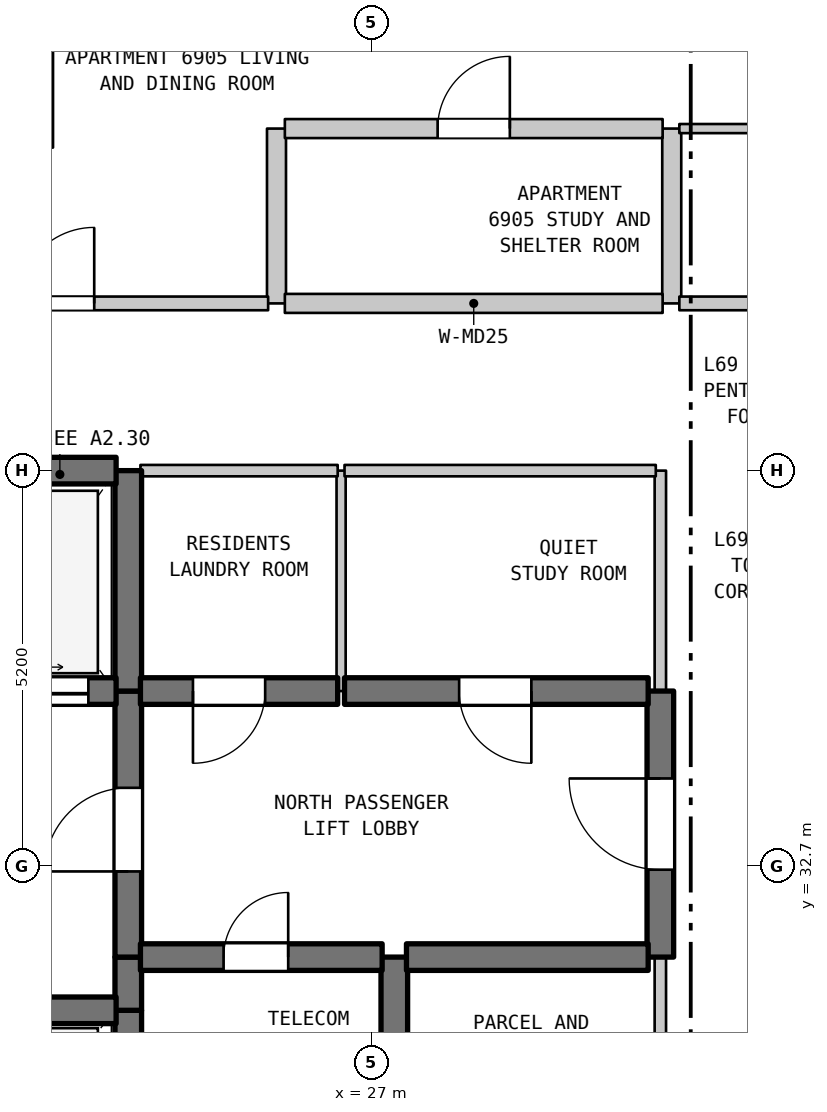
"""IFC4 building model, lengths in metres.
Left out: names, types, materials, properties, quantities, classifications, styles, units other than length and angle.
Written with IfcOpenShell. Run it as: python <this file> out.ifc"""

import sys

from ifc_helpers import new_model, si_unit, direction, frame, frame_2d, origin, place, context, subcontext, project, spatial, rectangle, extrude, element, fill, save


model = new_model("IFC4")
c1 = context("Model", 3, precision=1e-05, world=origin(), true_north=direction((0.0, 1.0)))
c2 = subcontext(c1, "Body", "Model", "MODEL_VIEW")
j1 = project(units=[si_unit("LENGTHUNIT", "METRE"), si_unit("PLANEANGLEUNIT", "RADIAN")], contexts=[c1])
p1 = place(None, origin())
s1 = spatial("IfcSite", under=j1, at=p1, CompositionType="ELEMENT")
p2 = place(p1, origin())
s2 = spatial("IfcBuilding", under=s1, at=p2, CompositionType="ELEMENT")
p3 = place(p2, frame((0.0, 0.0, 276.9)))
s3 = spatial("IfcBuildingStorey", under=s2, at=p3, CompositionType="ELEMENT", Elevation=276.9)
p4 = place(p3, frame((22.75, 42.15, 0.0), z_axis=(0.0, 0.0, 1.0), x_axis=(0.0, 1.0, 0.0)))
e1 = element("IfcWall", 1, at=p4, inside=s3, PredefinedType="PARTITIONING", context=c2, shape_type="SweptSolid", body=[
    extrude(rectangle(XDim=3.15, YDim=0.12, at=frame_2d((1.575, 0.0))), origin(), (0.0, 0.0, 1.0), 3.39),
])
p5 = place(p3, frame((23.8, 28.2, 0.0), z_axis=(0.0, 0.0, 1.0), x_axis=(0.0, 1.0, 0.0)))
e2 = element("IfcWall", 2, at=p5, inside=s3, PredefinedType="SHEAR", context=c2, shape_type="SweptSolid", body=[
    extrude(rectangle(XDim=2.6, YDim=0.35, at=frame_2d((1.3, 0.0))), origin(), (0.0, 0.0, 1.0), 3.39),
])
p6 = place(p3, frame((23.8, 30.8, 0.0), z_axis=(0.0, 0.0, 1.0), x_axis=(0.0, 1.0, 0.0)))
e3 = element("IfcWall", 3, at=p6, inside=s3, PredefinedType="SHEAR", context=c2, shape_type="SweptSolid", body=[
    extrude(rectangle(XDim=0.7, YDim=0.35, at=frame_2d((0.35, 0.0))), origin(), (0.0, 0.0, 1.0), 3.39),
])
p7 = place(p3, frame((23.8, 31.5, 0.0), z_axis=(0.0, 0.0, 1.0), x_axis=(0.0, 1.0, 0.0)))
e4 = element("IfcWall", 4, at=p7, inside=s3, PredefinedType="SHEAR", context=c2, shape_type="SweptSolid", body=[
    extrude(rectangle(XDim=3.5, YDim=0.35, at=frame_2d((1.75, 0.0))), origin(), (0.0, 0.0, 1.0), 3.39),
])
p8 = place(p7, frame((1.127, 0.0, 0.0)))
e5 = element("IfcOpeningElement", 5, at=p8, cuts=e4, PredefinedType="OPENING", context=c2, shape_type="SweptSolid", body=[
    extrude(rectangle(XDim=1.1, YDim=2.15, at=frame_2d((0.55, 1.075))), frame((0.0, 0.185, 0.0), z_axis=(0.0, -1.0, 0.0), x_axis=(1.0, 0.0, 0.0)), (0.0, 0.0, 1.0), 0.37),
])
p9 = place(p3, frame((23.8, 35.0, 0.0), z_axis=(0.0, 0.0, 1.0), x_axis=(0.0, 1.0, 0.0)))
e6 = element("IfcWall", 6, at=p9, inside=s3, PredefinedType="SHEAR", context=c2, shape_type="SweptSolid", body=[
    extrude(rectangle(XDim=2.9, YDim=0.35, at=frame_2d((1.45, 0.0))), origin(), (0.0, 0.0, 1.0), 3.39),
])
p10 = place(p3, frame((25.75, 40.1, 0.0), z_axis=(0.0, 0.0, 1.0), x_axis=(0.0, 1.0, 0.0)))
e7 = element("IfcWall", 7, at=p10, inside=s3, PredefinedType="STANDARD", context=c2, shape_type="SweptSolid", body=[
    extrude(rectangle(XDim=2.3, YDim=0.25, at=frame_2d((1.15, 0.0))), origin(), (0.0, 0.0, 1.0), 3.39),
])
p11 = place(p3, frame((26.6, 35.0, 0.0), z_axis=(0.0, 0.0, 1.0), x_axis=(0.0, 1.0, 0.0)))
e8 = element("IfcWall", 8, at=p11, inside=s3, PredefinedType="PARTITIONING", context=c2, shape_type="SweptSolid", body=[
    extrude(rectangle(XDim=2.9, YDim=0.12, at=frame_2d((1.45, 0.0))), origin(), (0.0, 0.0, 1.0), 3.39),
])
p12 = place(p3, frame((27.3, 28.9, 0.0), z_axis=(0.0, 0.0, 1.0), x_axis=(0.0, 1.0, 0.0)))
e9 = element("IfcWall", 9, at=p12, inside=s3, PredefinedType="SHEAR", context=c2, shape_type="SweptSolid", body=[
    extrude(rectangle(XDim=2.6, YDim=0.35, at=frame_2d((1.3, 0.0))), origin(), (0.0, 0.0, 1.0), 3.39),
])
p13 = place(p3, frame((30.8, 28.9, 0.0), z_axis=(0.0, 0.0, 1.0), x_axis=(0.0, 1.0, 0.0)))
e10 = element("IfcWall", 10, at=p13, inside=s3, PredefinedType="STANDARD", context=c2, shape_type="SweptSolid", body=[
    extrude(rectangle(XDim=2.6, YDim=0.15, at=frame_2d((1.3, 0.0))), origin(), (0.0, 0.0, 1.0), 3.39),
])
p14 = place(p3, frame((30.8, 31.5, 0.0), z_axis=(0.0, 0.0, 1.0), x_axis=(0.0, 1.0, 0.0)))
e11 = element("IfcWall", 11, at=p14, inside=s3, PredefinedType="SHEAR", context=c2, shape_type="SweptSolid", body=[
    extrude(rectangle(XDim=3.5, YDim=0.35, at=frame_2d((1.75, 0.0))), origin(), (0.0, 0.0, 1.0), 3.39),
])
p15 = place(p14, frame((1.15, 0.0, 0.0)))
e12 = element("IfcOpeningElement", 12, at=p15, cuts=e11, PredefinedType="OPENING", context=c2, shape_type="SweptSolid", body=[
    extrude(rectangle(XDim=1.2, YDim=2.2, at=frame_2d((0.6, 1.1))), frame((0.0, 0.185, 0.0), z_axis=(0.0, -1.0, 0.0), x_axis=(1.0, 0.0, 0.0)), (0.0, 0.0, 1.0), 0.37),
])
p16 = place(p3, frame((30.8, 35.0, 0.0), z_axis=(0.0, 0.0, 1.0), x_axis=(0.0, 1.0, 0.0)))
e13 = element("IfcWall", 13, at=p16, inside=s3, PredefinedType="STANDARD", context=c2, shape_type="SweptSolid", body=[
    extrude(rectangle(XDim=2.9, YDim=0.15, at=frame_2d((1.45, 0.0))), origin(), (0.0, 0.0, 1.0), 3.39),
])
p17 = place(p3, frame((30.95, 40.1, 0.0), z_axis=(0.0, 0.0, 1.0), x_axis=(0.0, 1.0, 0.0)))
e14 = element("IfcWall", 14, at=p17, inside=s3, PredefinedType="STANDARD", context=c2, shape_type="SweptSolid", body=[
    extrude(rectangle(XDim=2.3, YDim=0.25, at=frame_2d((1.15, 0.0))), origin(), (0.0, 0.0, 1.0), 3.39),
])
p18 = place(p3, frame((19.16, 30.8, 0.0), z_axis=(0.0, 0.0, 1.0), x_axis=(1.0, 0.0, 0.0)))
e15 = element("IfcWall", 15, at=p18, inside=s3, PredefinedType="SHEAR", context=c2, shape_type="SweptSolid", body=[
    extrude(rectangle(XDim=4.48, YDim=0.35, at=frame_2d((2.24, 0.0))), origin(), (0.0, 0.0, 1.0), 3.39),
])
p19 = place(p3, frame((23.96, 31.5, 0.0), z_axis=(0.0, 0.0, 1.0), x_axis=(1.0, 0.0, 0.0)))
e16 = element("IfcWall", 16, at=p19, inside=s3, PredefinedType="SHEAR", context=c2, shape_type="SweptSolid", body=[
    extrude(rectangle(XDim=3.18, YDim=0.35, at=frame_2d((1.59, 0.0))), origin(), (0.0, 0.0, 1.0), 3.39),
])
p20 = place(p19, frame((1.094, 0.0, 0.0)))
e17 = element("IfcOpeningElement", 17, at=p20, cuts=e16, PredefinedType="OPENING", context=c2, shape_type="SweptSolid", body=[
    extrude(rectangle(XDim=0.85, YDim=2.1, at=frame_2d((0.425, 1.05))), frame((0.0, 0.185, 0.0), z_axis=(0.0, -1.0, 0.0), x_axis=(1.0, 0.0, 0.0)), (0.0, 0.0, 1.0), 0.37),
])
p21 = place(p3, frame((27.46, 31.5, 0.0), z_axis=(0.0, 0.0, 1.0), x_axis=(1.0, 0.0, 0.0)))
e18 = element("IfcWall", 18, at=p21, inside=s3, PredefinedType="SHEAR", context=c2, shape_type="SweptSolid", body=[
    extrude(rectangle(XDim=3.18, YDim=0.35, at=frame_2d((1.59, 0.0))), origin(), (0.0, 0.0, 1.0), 3.39),
])
p22 = place(p3, frame((19.16, 35.0, 0.0), z_axis=(0.0, 0.0, 1.0), x_axis=(1.0, 0.0, 0.0)))
e19 = element("IfcWall", 19, at=p22, inside=s3, PredefinedType="SHEAR", context=c2, shape_type="SweptSolid", body=[
    extrude(rectangle(XDim=4.48, YDim=0.35, at=frame_2d((2.24, 0.0))), origin(), (0.0, 0.0, 1.0), 3.39),
])
p23 = place(p22, frame((0.365, 0.0, 0.0)))
e20 = element("IfcOpeningElement", 20, at=p23, cuts=e19, PredefinedType="OPENING", context=c2, shape_type="SweptSolid", body=[
    extrude(rectangle(XDim=1.35, YDim=2.2, at=frame_2d((0.675, 1.1))), frame((0.0, 0.185, 0.0), z_axis=(0.0, -1.0, 0.0), x_axis=(1.0, 0.0, 0.0)), (0.0, 0.0, 1.0), 0.37),
])
p24 = place(p22, frame((2.765, 0.0, 0.0)))
e21 = element("IfcOpeningElement", 21, at=p24, cuts=e19, PredefinedType="OPENING", context=c2, shape_type="SweptSolid", body=[
    extrude(rectangle(XDim=1.35, YDim=2.2, at=frame_2d((0.675, 1.1))), frame((0.0, 0.185, 0.0), z_axis=(0.0, -1.0, 0.0), x_axis=(1.0, 0.0, 0.0)), (0.0, 0.0, 1.0), 0.37),
])
p25 = place(p3, frame((23.96, 35.0, 0.0), z_axis=(0.0, 0.0, 1.0), x_axis=(1.0, 0.0, 0.0)))
e22 = element("IfcWall", 22, at=p25, inside=s3, PredefinedType="SHEAR", context=c2, shape_type="SweptSolid", body=[
    extrude(rectangle(XDim=2.595, YDim=0.35, at=frame_2d((1.297, 0.0))), origin(), (0.0, 0.0, 1.0), 3.39),
])
p26 = place(p25, frame((0.691, 0.0, 0.0)))
e23 = element("IfcOpeningElement", 23, at=p26, cuts=e22, PredefinedType="OPENING", context=c2, shape_type="SweptSolid", body=[
    extrude(rectangle(XDim=0.95, YDim=2.15, at=frame_2d((0.475, 1.075))), frame((0.0, 0.185, 0.0), z_axis=(0.0, -1.0, 0.0), x_axis=(1.0, 0.0, 0.0)), (0.0, 0.0, 1.0), 0.37),
])
p27 = place(p3, frame((26.645, 35.0, 0.0), z_axis=(0.0, 0.0, 1.0), x_axis=(1.0, 0.0, 0.0)))
e24 = element("IfcWall", 24, at=p27, inside=s3, PredefinedType="SHEAR", context=c2, shape_type="SweptSolid", body=[
    extrude(rectangle(XDim=3.995, YDim=0.35, at=frame_2d((1.998, 0.0))), origin(), (0.0, 0.0, 1.0), 3.39),
])
p28 = place(p27, frame((1.508, 0.0, 0.0)))
e25 = element("IfcOpeningElement", 25, at=p28, cuts=e24, PredefinedType="OPENING", context=c2, shape_type="SweptSolid", body=[
    extrude(rectangle(XDim=0.95, YDim=2.15, at=frame_2d((0.475, 1.075))), frame((0.0, 0.185, 0.0), z_axis=(0.0, -1.0, 0.0), x_axis=(1.0, 0.0, 0.0)), (0.0, 0.0, 1.0), 0.37),
])
p29 = place(p3, frame((19.16, 37.9, 0.0), z_axis=(0.0, 0.0, 1.0), x_axis=(1.0, 0.0, 0.0)))
e26 = element("IfcWall", 26, at=p29, inside=s3, PredefinedType="SHEAR", context=c2, shape_type="SweptSolid", body=[
    extrude(rectangle(XDim=4.48, YDim=0.35, at=frame_2d((2.24, 0.0))), origin(), (0.0, 0.0, 1.0), 3.39),
])
p30 = place(p3, frame((23.96, 37.9, 0.0), z_axis=(0.0, 0.0, 1.0), x_axis=(1.0, 0.0, 0.0)))
e27 = element("IfcWall", 27, at=p30, inside=s3, PredefinedType="STANDARD", context=c2, shape_type="SweptSolid", body=[
    extrude(rectangle(XDim=2.595, YDim=0.15, at=frame_2d((1.297, 0.0))), origin(), (0.0, 0.0, 1.0), 2.89),
])
p31 = place(p3, frame((26.645, 37.9, 0.0), z_axis=(0.0, 0.0, 1.0), x_axis=(1.0, 0.0, 0.0)))
e28 = element("IfcWall", 28, at=p31, inside=s3, PredefinedType="STANDARD", context=c2, shape_type="SweptSolid", body=[
    extrude(rectangle(XDim=4.095, YDim=0.15, at=frame_2d((2.047, 0.0))), origin(), (0.0, 0.0, 1.0), 2.89),
])
p32 = place(p3, frame((20.545, 40.1, 0.0), z_axis=(0.0, 0.0, 1.0), x_axis=(1.0, 0.0, 0.0)))
e29 = element("IfcWall", 29, at=p32, inside=s3, PredefinedType="STANDARD", context=c2, shape_type="SweptSolid", body=[
    extrude(rectangle(XDim=5.095, YDim=0.18, at=frame_2d((2.547, 0.0))), origin(), (0.0, 0.0, 1.0), 3.39),
])
p33 = place(p32, frame((1.807, 0.0, 0.0)))
e30 = element("IfcOpeningElement", 30, at=p33, cuts=e29, PredefinedType="OPENING", context=c2, shape_type="SweptSolid", body=[
    extrude(rectangle(XDim=1.0, YDim=2.15, at=frame_2d((0.5, 1.075))), frame((0.0, 0.1, 0.0), z_axis=(0.0, -1.0, 0.0), x_axis=(1.0, 0.0, 0.0)), (0.0, 0.0, 1.0), 0.2),
])
p34 = place(p3, frame((25.86, 40.1, 0.0), z_axis=(0.0, 0.0, 1.0), x_axis=(1.0, 0.0, 0.0)))
e31 = element("IfcWall", 31, at=p34, inside=s3, PredefinedType="STANDARD", context=c2, shape_type="SweptSolid", body=[
    extrude(rectangle(XDim=4.97, YDim=0.25, at=frame_2d((2.485, 0.0))), origin(), (0.0, 0.0, 1.0), 3.39),
])
p35 = place(p3, frame((31.05, 40.1, 0.0), z_axis=(0.0, 0.0, 1.0), x_axis=(1.0, 0.0, 0.0)))
e32 = element("IfcWall", 32, at=p35, inside=s3, PredefinedType="STANDARD", context=c2, shape_type="SweptSolid", body=[
    extrude(rectangle(XDim=1.875, YDim=0.18, at=frame_2d((0.938, 0.0))), origin(), (0.0, 0.0, 1.0), 3.39),
])
p36 = place(p3, frame((25.86, 42.4, 0.0), z_axis=(0.0, 0.0, 1.0), x_axis=(1.0, 0.0, 0.0)))
e33 = element("IfcWall", 33, at=p36, inside=s3, PredefinedType="STANDARD", context=c2, shape_type="SweptSolid", body=[
    extrude(rectangle(XDim=4.97, YDim=0.25, at=frame_2d((2.485, 0.0))), origin(), (0.0, 0.0, 1.0), 3.39),
])
p37 = place(p36, frame((2.01, 0.0, 0.0)))
e34 = element("IfcOpeningElement", 34, at=p37, cuts=e33, PredefinedType="OPENING", context=c2, shape_type="SweptSolid", body=[
    extrude(rectangle(XDim=0.95, YDim=2.15, at=frame_2d((0.475, 1.075))), frame((0.0, 0.135, 0.0), z_axis=(0.0, -1.0, 0.0), x_axis=(1.0, 0.0, 0.0)), (0.0, 0.0, 1.0), 0.27),
])
p38 = place(p3, frame((31.05, 42.4, 0.0), z_axis=(0.0, 0.0, 1.0), x_axis=(1.0, 0.0, 0.0)))
e35 = element("IfcWall", 35, at=p38, inside=s3, PredefinedType="PARTITIONING", context=c2, shape_type="SweptSolid", body=[
    extrude(rectangle(XDim=4.045, YDim=0.12, at=frame_2d((2.022, 0.0))), origin(), (0.0, 0.0, 1.0), 3.39),
])
p39 = place(p38, frame((1.467, 0.0, 0.0)))
e36 = element("IfcOpeningElement", 36, at=p39, cuts=e35, PredefinedType="OPENING", context=c2, shape_type="SweptSolid", body=[
    extrude(rectangle(XDim=0.9, YDim=2.1, at=frame_2d((0.45, 1.05))), frame((0.0, 0.07, 0.0), z_axis=(0.0, -1.0, 0.0), x_axis=(1.0, 0.0, 0.0)), (0.0, 0.0, 1.0), 0.14),
])
p40 = place(p8, origin())
e37 = element("IfcDoor", 37, at=p40, inside=s3, OperationType="SINGLE_SWING_LEFT", PredefinedType="DOOR", context=c2, shape_type="SweptSolid", body=[
    extrude(rectangle(XDim=1.1, YDim=2.15, at=frame_2d((0.55, 1.075))), frame((0.0, 0.025, 0.0), z_axis=(0.0, -1.0, 0.0), x_axis=(1.0, 0.0, 0.0)), (0.0, 0.0, 1.0), 0.05),
])
fill(e5, e37)
p41 = place(p15, origin())
e38 = element("IfcDoor", 38, at=p41, inside=s3, OperationType="SINGLE_SWING_RIGHT", PredefinedType="DOOR", context=c2, shape_type="SweptSolid", body=[
    extrude(rectangle(XDim=1.2, YDim=2.2, at=frame_2d((0.6, 1.1))), frame((0.0, 0.025, 0.0), z_axis=(0.0, -1.0, 0.0), x_axis=(1.0, 0.0, 0.0)), (0.0, 0.0, 1.0), 0.05),
])
fill(e12, e38)
p42 = place(p20, origin())
e39 = element("IfcDoor", 39, at=p42, inside=s3, OperationType="SINGLE_SWING_RIGHT", PredefinedType="DOOR", context=c2, shape_type="SweptSolid", body=[
    extrude(rectangle(XDim=0.85, YDim=2.1, at=frame_2d((0.425, 1.05))), frame((0.0, 0.025, 0.0), z_axis=(0.0, -1.0, 0.0), x_axis=(1.0, 0.0, 0.0)), (0.0, 0.0, 1.0), 0.05),
])
fill(e17, e39)
p43 = place(p24, origin())
e40 = element("IfcDoor", 40, at=p43, inside=s3, OperationType="DOUBLE_DOOR_SLIDING", PredefinedType="DOOR", context=c2, shape_type="SweptSolid", body=[
    extrude(rectangle(XDim=1.35, YDim=2.2, at=frame_2d((0.675, 1.1))), frame((0.0, 0.025, 0.0), z_axis=(0.0, -1.0, 0.0), x_axis=(1.0, 0.0, 0.0)), (0.0, 0.0, 1.0), 0.05),
])
fill(e21, e40)
p44 = place(p26, frame((0.95, 0.0, 0.0), z_axis=(0.0, 0.0, 1.0), x_axis=(-1.0, 0.0, 0.0)))
e41 = element("IfcDoor", 41, at=p44, inside=s3, OperationType="SINGLE_SWING_LEFT", PredefinedType="DOOR", context=c2, shape_type="SweptSolid", body=[
    extrude(rectangle(XDim=0.95, YDim=2.15, at=frame_2d((0.475, 1.075))), frame((0.0, 0.025, 0.0), z_axis=(0.0, -1.0, 0.0), x_axis=(1.0, 0.0, 0.0)), (0.0, 0.0, 1.0), 0.05),
])
fill(e23, e41)
p45 = place(p28, frame((0.95, 0.0, 0.0), z_axis=(0.0, 0.0, 1.0), x_axis=(-1.0, 0.0, 0.0)))
e42 = element("IfcDoor", 42, at=p45, inside=s3, OperationType="SINGLE_SWING_RIGHT", PredefinedType="DOOR", context=c2, shape_type="SweptSolid", body=[
    extrude(rectangle(XDim=0.95, YDim=2.15, at=frame_2d((0.475, 1.075))), frame((0.0, 0.025, 0.0), z_axis=(0.0, -1.0, 0.0), x_axis=(1.0, 0.0, 0.0)), (0.0, 0.0, 1.0), 0.05),
])
fill(e25, e42)
p46 = place(p33, origin())
e43 = element("IfcDoor", 43, at=p46, inside=s3, OperationType="SINGLE_SWING_RIGHT", PredefinedType="DOOR", context=c2, shape_type="SweptSolid", body=[
    extrude(rectangle(XDim=1.0, YDim=2.15, at=frame_2d((0.5, 1.075))), frame((0.0, 0.025, 0.0), z_axis=(0.0, -1.0, 0.0), x_axis=(1.0, 0.0, 0.0)), (0.0, 0.0, 1.0), 0.05),
])
fill(e30, e43)
p47 = place(p37, origin())
e44 = element("IfcDoor", 44, at=p47, inside=s3, OperationType="SINGLE_SWING_RIGHT", PredefinedType="DOOR", context=c2, shape_type="SweptSolid", body=[
    extrude(rectangle(XDim=0.95, YDim=2.15, at=frame_2d((0.475, 1.075))), frame((0.0, 0.025, 0.0), z_axis=(0.0, -1.0, 0.0), x_axis=(1.0, 0.0, 0.0)), (0.0, 0.0, 1.0), 0.05),
])
fill(e34, e44)
save(model, sys.argv[1])
